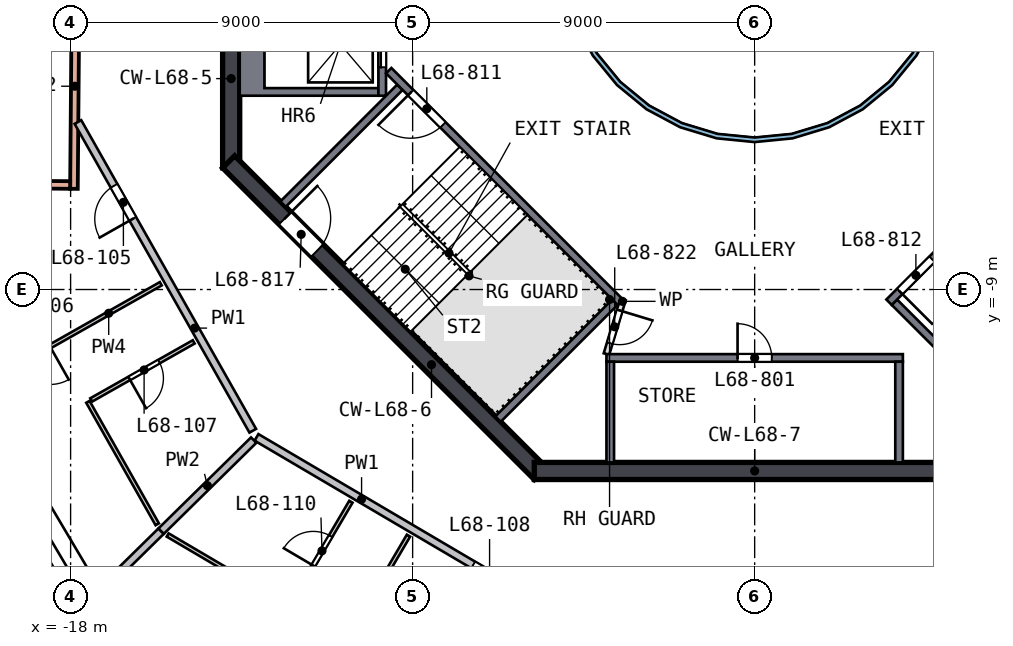
"""IFC4 building model, lengths in metres.
Left out: names, types, materials, properties, quantities, classifications, styles, units other than length and angle.
Written with IfcOpenShell. Run it as: python <this file> out.ifc"""

import sys

from ifc_helpers import new_model, si_unit, direction, frame, frame_2d, origin, place, context, subcontext, project, spatial, polyline, rectangle, outline, extrude, element, fill, save


model = new_model("IFC4")
c1 = context("Model", 3, precision=1e-05, world=origin(), true_north=direction((0.0, 1.0)))
c2 = subcontext(c1, "Body", "Model", "MODEL_VIEW")
j1 = project(units=[si_unit("LENGTHUNIT", "METRE"), si_unit("PLANEANGLEUNIT", "RADIAN")], contexts=[c1])
p1 = place(None, origin())
s1 = spatial("IfcSite", under=j1, at=p1, CompositionType="ELEMENT")
p2 = place(p1, origin())
s2 = spatial("IfcBuilding", under=s1, at=p2, CompositionType="ELEMENT")
p3 = place(p2, frame((0.0, 0.0, 277.5)))
s3 = spatial("IfcBuildingStorey", under=s2, at=p3, CompositionType="ELEMENT", Elevation=277.5)
p4 = place(p3, frame((-13.775, 5.799, 0.0), z_axis=(0.0, 0.0, 1.0), x_axis=(0.0, -1.0, 0.0)))
e1 = element("IfcWall", 1, at=p4, inside=s3, PredefinedType="SHEAR", context=c2, shape_type="SweptSolid", body=[
    extrude(rectangle(XDim=11.598, YDim=0.45, at=frame_2d((5.799, 0.0))), origin(), (0.0, 0.0, 1.0), 3.5),
])
p5 = place(p4, frame((4.899, 0.0, 0.0)))
e2 = element("IfcOpeningElement", 2, at=p5, cuts=e1, PredefinedType="OPENING", context=c2, shape_type="SweptSolid", body=[
    extrude(rectangle(XDim=1.8, YDim=2.1, at=frame_2d((0.9, 1.05))), frame((0.0, 0.235, 0.0), z_axis=(0.0, -1.0, 0.0), x_axis=(1.0, 0.0, 0.0)), (0.0, 0.0, 1.0), 0.47),
])
p6 = place(p3, frame((-13.841, -5.64, 0.0), z_axis=(0.0, 0.0, 1.0), x_axis=(0.707106781, -0.707106781, 0.0)))
e3 = element("IfcWall", 3, at=p6, inside=s3, PredefinedType="SHEAR", context=c2, shape_type="SweptSolid", body=[
    extrude(rectangle(XDim=11.598, YDim=0.45, at=frame_2d((5.799, 0.0))), origin(), (0.0, 0.0, 1.0), 3.5),
])
p7 = place(p6, frame((2.099, 0.0, 0.0)))
e4 = element("IfcOpeningElement", 4, at=p7, cuts=e3, PredefinedType="OPENING", context=c2, shape_type="SweptSolid", body=[
    extrude(rectangle(XDim=1.2, YDim=2.1, at=frame_2d((0.6, 1.05))), frame((0.0, 0.235, 0.0), z_axis=(0.0, -1.0, 0.0), x_axis=(1.0, 0.0, 0.0)), (0.0, 0.0, 1.0), 0.47),
])
p8 = place(p3, frame((-5.799, -13.775, 0.0), z_axis=(0.0, 0.0, 1.0), x_axis=(1.0, 0.0, 0.0)))
e5 = element("IfcWall", 5, at=p8, inside=s3, PredefinedType="SHEAR", context=c2, shape_type="SweptSolid", body=[
    extrude(rectangle(XDim=11.598, YDim=0.45, at=frame_2d((5.799, 0.0))), origin(), (0.0, 0.0, 1.0), 3.5),
])
p9 = place(p3, frame((-19.579, -14.503, 0.0), z_axis=(0.0, 0.0, 1.0), x_axis=(0.492728526, -0.870183084, 0.0)))
e6 = element("IfcWall", 6, at=p9, inside=s3, PredefinedType="SOLIDWALL", context=c2, shape_type="SweptSolid", body=[
    extrude(rectangle(XDim=3.427, YDim=0.15, at=frame_2d((1.713, 0.0))), origin(), (0.0, 0.0, 1.0), 2.525),
])
p10 = place(p9, frame((0.4, 0.0, 0.0)))
e7 = element("IfcOpeningElement", 7, at=p10, cuts=e6, PredefinedType="OPENING", context=c2, shape_type="SweptSolid", body=[
    extrude(rectangle(XDim=2.4, YDim=2.4, at=frame_2d((1.2, 1.2))), frame((0.0, 0.085, 0.0), z_axis=(0.0, -1.0, 0.0), x_axis=(1.0, 0.0, 0.0)), (0.0, 0.0, 1.0), 0.17),
])
p11 = place(p3, frame((-17.912, -6.35, 0.0), z_axis=(0.0, 0.0, 1.0), x_axis=(0.008375922, 0.999964921, 0.0)))
e8 = element("IfcWall", 8, at=p11, inside=s3, PredefinedType="SOLIDWALL", context=c2, shape_type="SweptSolid", body=[
    extrude(rectangle(XDim=13.0, YDim=0.2, at=frame_2d((6.5, 0.0))), origin(), (0.0, 0.0, 1.0), 3.19),
])
p12 = place(p11, frame((5.6, 0.0, 0.0)))
e9 = element("IfcOpeningElement", 9, at=p12, cuts=e8, PredefinedType="OPENING", context=c2, shape_type="SweptSolid", body=[
    extrude(rectangle(XDim=1.8, YDim=2.4, at=frame_2d((0.9, 1.2))), frame((0.0, 0.11, 0.0), z_axis=(0.0, -1.0, 0.0), x_axis=(1.0, 0.0, 0.0)), (0.0, 0.0, 1.0), 0.22),
])
p13 = place(p3, frame((-23.179, -6.206, 0.0), z_axis=(0.0, 0.0, 1.0), x_axis=(0.999965043, -0.008361386, 0.0)))
e10 = element("IfcWall", 10, at=p13, inside=s3, PredefinedType="SOLIDWALL", context=c2, shape_type="SweptSolid", body=[
    extrude(rectangle(XDim=5.168, YDim=0.2, at=frame_2d((2.584, 0.0))), origin(), (0.0, 0.0, 1.0), 3.19),
])
p14 = place(p3, origin())
e11 = element("IfcWall", 11, at=p14, inside=s3, PredefinedType="SOLIDWALL", context=c2, shape_type="SweptSolid", body=[
    extrude(outline(polyline([(-13.55, -3.9), (-13.55, -1.2), (-9.9, -1.2), (-9.9, -1.4), (-12.9, -1.4), (-12.9, -3.7), (-9.9, -3.7), (-9.9, -3.9), (-13.55, -3.9)])), origin(), (0.0, 0.0, 1.0), 3.19),
])
p15 = place(p3, frame((-9.8, -1.2, 0.0), z_axis=(0.0, 0.0, 1.0), x_axis=(0.0, -1.0, 0.0)))
e12 = element("IfcWall", 12, at=p15, inside=s3, PredefinedType="SOLIDWALL", context=c2, shape_type="SweptSolid", body=[
    extrude(rectangle(XDim=2.7, YDim=0.2, at=frame_2d((1.35, 0.0))), origin(), (0.0, 0.0, 1.0), 3.19),
])
p16 = place(p15, frame((0.75, 0.0, 0.0)))
e13 = element("IfcOpeningElement", 13, at=p16, cuts=e12, PredefinedType="OPENING", context=c2, shape_type="SweptSolid", body=[
    extrude(rectangle(XDim=1.2, YDim=2.1, at=frame_2d((0.6, 1.05))), frame((0.0, 0.11, 0.0), z_axis=(0.0, -1.0, 0.0), x_axis=(1.0, 0.0, 0.0)), (0.0, 0.0, 1.0), 0.22),
])
p17 = place(p3, frame((-3.9, -10.8, 0.0), z_axis=(0.0, 0.0, 1.0), x_axis=(1.0, 0.0, 0.0)))
e14 = element("IfcWall", 14, at=p17, inside=s3, PredefinedType="SOLIDWALL", context=c2, shape_type="SweptSolid", body=[
    extrude(rectangle(XDim=7.8, YDim=0.2, at=frame_2d((3.9, 0.0))), origin(), (0.0, 0.0, 1.0), 3.19),
])
p18 = place(p17, frame((3.45, 0.0, 0.0)))
e15 = element("IfcOpeningElement", 15, at=p18, cuts=e14, PredefinedType="OPENING", context=c2, shape_type="SweptSolid", body=[
    extrude(rectangle(XDim=0.9, YDim=2.1, at=frame_2d((0.45, 1.05))), frame((0.0, 0.11, 0.0), z_axis=(0.0, -1.0, 0.0), x_axis=(1.0, 0.0, 0.0)), (0.0, 0.0, 1.0), 0.22),
])
for number, where, z_axis, x_axis in (
    (16, (-3.8, -10.9, 0.0), (0.0, 0.0, 1.0), (0.0, -1.0, 0.0)),
    (17, (3.8, -10.9, 0.0), (0.0, 0.0, 1.0), (0.0, -1.0, 0.0)),
):
    element("IfcWall", number, at=place(p3, frame(where, z_axis=z_axis, x_axis=x_axis)), inside=s3, PredefinedType="SOLIDWALL", context=c2, shape_type="SweptSolid", body=[
        extrude(rectangle(XDim=2.65, YDim=0.2, at=frame_2d((1.325, 0.0))), origin(), (0.0, 0.0, 1.0), 3.19),
    ])
p19 = place(p3, frame((-3.535, -9.334, 0.0), z_axis=(0.0, 0.0, 1.0), x_axis=(-0.707120946, 0.707092617, 0.0)))
e18 = element("IfcWall", 18, at=p19, inside=s3, PredefinedType="SOLIDWALL", context=c2, shape_type="SweptSolid", body=[
    extrude(rectangle(XDim=8.618, YDim=0.2, at=frame_2d((4.309, 0.0))), origin(), (0.0, 0.0, 1.0), 3.19),
])
p20 = place(p19, frame((6.6, 0.0, 0.0)))
e19 = element("IfcOpeningElement", 19, at=p20, cuts=e18, PredefinedType="OPENING", context=c2, shape_type="SweptSolid", body=[
    extrude(rectangle(XDim=1.2, YDim=2.1, at=frame_2d((0.6, 1.05))), frame((0.0, 0.11, 0.0), z_axis=(0.0, -1.0, 0.0), x_axis=(1.0, 0.0, 0.0)), (0.0, 0.0, 1.0), 0.22),
])
for number, where, z_axis, x_axis in (
    (20, (-9.334, -3.677, 0.0), (0.0, 0.0, 1.0), (-0.707, -0.707, 0.0)),
    (21, (-3.677, -9.334, 0.0), (0.0, 0.0, 1.0), (-0.707, -0.707, 0.0)),
):
    element("IfcWall", number, at=place(p3, frame(where, z_axis=z_axis, x_axis=x_axis)), inside=s3, PredefinedType="SOLIDWALL", context=c2, shape_type="SweptSolid", body=[
        extrude(rectangle(XDim=4.35, YDim=0.2, at=frame_2d((2.175, 0.0))), origin(), (0.0, 0.0, 1.0), 3.19),
    ])
p21 = place(p3, frame((9.629, -3.24, 0.0), z_axis=(0.0, 0.0, 1.0), x_axis=(-0.707120946, -0.707092617, 0.0)))
e22 = element("IfcWall", 22, at=p21, inside=s3, PredefinedType="SOLIDWALL", context=c2, shape_type="SweptSolid", body=[
    extrude(rectangle(XDim=8.618, YDim=0.2, at=frame_2d((4.309, 0.0))), origin(), (0.0, 0.0, 1.0), 3.19),
])
p22 = place(p21, frame((7.018, 0.0, 0.0)))
e23 = element("IfcOpeningElement", 23, at=p22, cuts=e22, PredefinedType="OPENING", context=c2, shape_type="SweptSolid", body=[
    extrude(rectangle(XDim=1.2, YDim=2.1, at=frame_2d((0.6, 1.05))), frame((0.0, 0.11, 0.0), z_axis=(0.0, -1.0, 0.0), x_axis=(1.0, 0.0, 0.0)), (0.0, 0.0, 1.0), 0.22),
])
p23 = place(p3, frame((3.677, -9.334, 0.0), z_axis=(0.0, 0.0, 1.0), x_axis=(0.707106781, -0.707106781, 0.0)))
e24 = element("IfcWall", 24, at=p23, inside=s3, PredefinedType="SOLIDWALL", context=c2, shape_type="SweptSolid", body=[
    extrude(rectangle(XDim=4.35, YDim=0.2, at=frame_2d((2.175, 0.0))), origin(), (0.0, 0.0, 1.0), 3.19),
])
p24 = place(p3, frame((-3.465, -9.263, 0.0), z_axis=(0.0, 0.0, 1.0), x_axis=(-0.289808785, -0.957084567, 0.0)))
e25 = element("IfcWall", 25, at=p24, inside=s3, PredefinedType="PARTITIONING", context=c2, shape_type="SweptSolid", body=[
    extrude(rectangle(XDim=1.501, YDim=0.15, at=frame_2d((0.75, 0.0))), origin(), (0.0, 0.0, 1.0), 3.19),
])
p25 = place(p24, frame((0.301, 0.0, 0.0)))
e26 = element("IfcOpeningElement", 26, at=p25, cuts=e25, PredefinedType="OPENING", context=c2, shape_type="SweptSolid", body=[
    extrude(rectangle(XDim=0.9, YDim=2.1, at=frame_2d((0.45, 1.05))), frame((0.0, 0.085, 0.0), z_axis=(0.0, -1.0, 0.0), x_axis=(1.0, 0.0, 0.0)), (0.0, 0.0, 1.0), 0.17),
])
p26 = place(p3, origin())
e27 = element("IfcWall", 27, at=p26, inside=s3, PredefinedType="SOLIDWALL", context=c2, shape_type="SweptSolid", body=[
    extrude(outline(polyline([(5.021, -0.999), (4.73, -1.959), (4.257, -2.844), (3.62, -3.62), (2.844, -4.257), (1.959, -4.73), (0.999, -5.021), (0.0, -5.12), (-0.999, -5.021), (-1.959, -4.73), (-2.844, -4.257), (-3.62, -3.62), (-4.257, -2.844), (-4.73, -1.959), (-5.021, -0.999), (-5.12, 0.0), (-5.021, 0.999), (-4.73, 1.959), (-4.257, 2.844), (-3.62, 3.62), (-2.844, 4.257), (-1.959, 4.73), (-0.999, 5.021), (0.0, 5.12), (0.999, 5.021), (1.959, 4.73), (2.844, 4.257), (3.62, 3.62), (4.257, 2.844), (4.73, 1.959), (5.021, 0.999), (5.12, 0.0), (5.021, -0.999)]), holes=[polyline([(4.904, 0.976), (4.619, 1.913), (4.157, 2.778), (3.535, 3.535), (2.778, 4.157), (1.913, 4.619), (0.976, 4.904), (0.0, 5.0), (-0.976, 4.904), (-1.913, 4.619), (-2.778, 4.157), (-3.535, 3.535), (-4.157, 2.778), (-4.619, 1.913), (-4.904, 0.976), (-5.0, 0.0), (-4.904, -0.976), (-4.619, -1.913), (-4.157, -2.778), (-3.535, -3.535), (-2.778, -4.157), (-1.913, -4.619), (-0.976, -4.904), (0.0, -5.0), (0.976, -4.904), (1.913, -4.619), (2.778, -4.157), (3.535, -3.535), (4.157, -2.778), (4.619, -1.913), (4.904, -0.976), (5.0, 0.0), (4.904, 0.976)])]), origin(), (0.0, 0.0, 1.0), 3.19),
])
p27 = place(p3, frame((-13.207, -12.717, 0.0), z_axis=(0.0, 0.0, 1.0), x_axis=(-0.492724884, 0.870185146, 0.0)))
e28 = element("IfcWall", 28, at=p27, inside=s3, PredefinedType="SOLIDWALL", context=c2, shape_type="SweptSolid", body=[
    extrude(rectangle(XDim=9.336, YDim=0.2, at=frame_2d((4.668, 0.0))), origin(), (0.0, 0.0, 1.0), 3.19),
])
p28 = place(p27, frame((6.408, 0.0, 0.0)))
e29 = element("IfcOpeningElement", 29, at=p28, cuts=e28, PredefinedType="OPENING", context=c2, shape_type="SweptSolid", body=[
    extrude(rectangle(XDim=1.0, YDim=2.1, at=frame_2d((0.5, 1.05))), frame((0.0, 0.11, 0.0), z_axis=(0.0, -1.0, 0.0), x_axis=(1.0, 0.0, 0.0)), (0.0, 0.0, 1.0), 0.22),
])
p29 = place(p3, frame((-4.907, -17.718, 0.0), z_axis=(0.0, 0.0, 1.0), x_axis=(-0.861806246, 0.507237612, 0.0)))
e30 = element("IfcWall", 30, at=p29, inside=s3, PredefinedType="SOLIDWALL", context=c2, shape_type="SweptSolid", body=[
    extrude(rectangle(XDim=9.517, YDim=0.2, at=frame_2d((4.758, 0.0))), origin(), (0.0, 0.0, 1.0), 3.19),
])
p30 = place(p29, frame((1.9, 0.0, 0.0)))
e31 = element("IfcOpeningElement", 31, at=p30, cuts=e30, PredefinedType="OPENING", context=c2, shape_type="SweptSolid", body=[
    extrude(rectangle(XDim=1.0, YDim=2.1, at=frame_2d((0.5, 1.05))), frame((0.0, 0.11, 0.0), z_axis=(0.0, -1.0, 0.0), x_axis=(1.0, 0.0, 0.0)), (0.0, 0.0, 1.0), 0.22),
])
p31 = place(p3, frame((-15.618, -15.359, 0.0), z_axis=(0.0, 0.0, 1.0), x_axis=(-0.71298711, -0.701177139, 0.0)))
e32 = element("IfcWall", 32, at=p31, inside=s3, PredefinedType="SOLIDWALL", context=c2, shape_type="SweptSolid", body=[
    extrude(rectangle(XDim=3.06, YDim=0.2, at=frame_2d((1.53, 0.0))), origin(), (0.0, 0.0, 1.0), 2.69),
])
p32 = place(p3, frame((-13.182, -12.963, 0.0), z_axis=(0.0, 0.0, 1.0), x_axis=(-0.71297783, -0.701186576, 0.0)))
e33 = element("IfcWall", 33, at=p32, inside=s3, PredefinedType="SOLIDWALL", context=c2, shape_type="SweptSolid", body=[
    extrude(rectangle(XDim=3.416, YDim=0.2, at=frame_2d((1.708, 0.0))), origin(), (0.0, 0.0, 1.0), 3.19),
])
p33 = place(p3, frame((-15.627, -8.849, 0.0), z_axis=(0.0, 0.0, 1.0), x_axis=(-0.870190704, -0.492715069, 0.0)))
e34 = element("IfcWall", 34, at=p33, inside=s3, PredefinedType="PARTITIONING", context=c2, shape_type="SweptSolid", body=[
    extrude(rectangle(XDim=6.15, YDim=0.1, at=frame_2d((3.075, 0.0))), origin(), (0.0, 0.0, 1.0), 3.19),
])
p34 = place(p33, frame((3.35, 0.0, 0.0)))
e35 = element("IfcOpeningElement", 35, at=p34, cuts=e34, PredefinedType="OPENING", context=c2, shape_type="SweptSolid", body=[
    extrude(rectangle(XDim=1.0, YDim=2.1, at=frame_2d((0.5, 1.05))), frame((0.0, 0.06, 0.0), z_axis=(0.0, -1.0, 0.0), x_axis=(1.0, 0.0, 0.0)), (0.0, 0.0, 1.0), 0.12),
])
p35 = place(p3, frame((-17.545, -11.955, 0.0), z_axis=(0.0, 0.0, 1.0), x_axis=(0.492756443, -0.870167276, 0.0)))
e36 = element("IfcWall", 36, at=p35, inside=s3, PredefinedType="PARTITIONING", context=c2, shape_type="SweptSolid", body=[
    extrude(rectangle(XDim=3.704, YDim=0.1, at=frame_2d((1.852, 0.0))), origin(), (0.0, 0.0, 1.0), 3.19),
])
p36 = place(p3, frame((-14.761, -10.379, 0.0), z_axis=(0.0, 0.0, 1.0), x_axis=(-0.870194419, -0.492708506, 0.0)))
e37 = element("IfcWall", 37, at=p36, inside=s3, PredefinedType="PARTITIONING", context=c2, shape_type="SweptSolid", body=[
    extrude(rectangle(XDim=3.1, YDim=0.1, at=frame_2d((1.55, 0.0))), origin(), (0.0, 0.0, 1.0), 3.19),
])
p37 = place(p36, frame((1.05, 0.0, 0.0)))
e38 = element("IfcOpeningElement", 38, at=p37, cuts=e37, PredefinedType="OPENING", context=c2, shape_type="SweptSolid", body=[
    extrude(rectangle(XDim=0.9, YDim=2.1, at=frame_2d((0.45, 1.05))), frame((0.0, 0.06, 0.0), z_axis=(0.0, -1.0, 0.0), x_axis=(1.0, 0.0, 0.0)), (0.0, 0.0, 1.0), 0.12),
])
p38 = place(p3, frame((-15.446, -15.46, 0.0), z_axis=(0.0, 0.0, 1.0), x_axis=(0.861815808, -0.507221365, 0.0)))
e39 = element("IfcWall", 39, at=p38, inside=s3, PredefinedType="PARTITIONING", context=c2, shape_type="SweptSolid", body=[
    extrude(rectangle(XDim=3.711, YDim=0.1, at=frame_2d((1.855, 0.0))), origin(), (0.0, 0.0, 1.0), 3.19),
])
p39 = place(p3, frame((-12.197, -17.256, 0.0), z_axis=(0.0, 0.0, 1.0), x_axis=(0.5072507, 0.861798542, 0.0)))
e40 = element("IfcWall", 40, at=p39, inside=s3, PredefinedType="PARTITIONING", context=c2, shape_type="SweptSolid", body=[
    extrude(rectangle(XDim=3.1, YDim=0.1, at=frame_2d((1.55, 0.0))), origin(), (0.0, 0.0, 1.0), 3.19),
])
p40 = place(p39, frame((1.15, 0.0, 0.0)))
e41 = element("IfcOpeningElement", 41, at=p40, cuts=e40, PredefinedType="OPENING", context=c2, shape_type="SweptSolid", body=[
    extrude(rectangle(XDim=0.9, YDim=2.1, at=frame_2d((0.45, 1.05))), frame((0.0, 0.06, 0.0), z_axis=(0.0, -1.0, 0.0), x_axis=(1.0, 0.0, 0.0)), (0.0, 0.0, 1.0), 0.12),
])
p41 = place(p3, frame((-12.229, -20.777, 0.0), z_axis=(0.0, 0.0, 1.0), x_axis=(0.507256048, 0.861795394, 0.0)))
e42 = element("IfcWall", 42, at=p41, inside=s3, PredefinedType="PARTITIONING", context=c2, shape_type="SweptSolid", body=[
    extrude(rectangle(XDim=6.15, YDim=0.1, at=frame_2d((3.075, 0.0))), origin(), (0.0, 0.0, 1.0), 3.19),
])
p42 = place(p41, frame((1.8, 0.0, 0.0)))
e43 = element("IfcOpeningElement", 43, at=p42, cuts=e42, PredefinedType="OPENING", context=c2, shape_type="SweptSolid", body=[
    extrude(rectangle(XDim=1.0, YDim=2.1, at=frame_2d((0.5, 1.05))), frame((0.0, 0.06, 0.0), z_axis=(0.0, -1.0, 0.0), x_axis=(1.0, 0.0, 0.0)), (0.0, 0.0, 1.0), 0.12),
])
p43 = place(p10, origin())
e44 = element("IfcDoor", 44, at=p43, inside=s3, OperationType="SLIDING_TO_RIGHT", PredefinedType="DOOR", context=c2, shape_type="SweptSolid", body=[
    extrude(rectangle(XDim=2.4, YDim=2.4, at=frame_2d((1.2, 1.2))), frame((0.0, 0.025, 0.0), z_axis=(0.0, -1.0, 0.0), x_axis=(1.0, 0.0, 0.0)), (0.0, 0.0, 1.0), 0.05),
])
fill(e7, e44)
p44 = place(p18, origin())
e45 = element("IfcDoor", 45, at=p44, inside=s3, OperationType="SINGLE_SWING_LEFT", PredefinedType="DOOR", context=c2, shape_type="SweptSolid", body=[
    extrude(rectangle(XDim=0.9, YDim=2.1, at=frame_2d((0.45, 1.05))), frame((0.0, 0.025, 0.0), z_axis=(0.0, -1.0, 0.0), x_axis=(1.0, 0.0, 0.0)), (0.0, 0.0, 1.0), 0.05),
])
fill(e15, e45)
p45 = place(p16, origin())
e46 = element("IfcDoor", 46, at=p45, inside=s3, OperationType="DOUBLE_DOOR_SLIDING", PredefinedType="DOOR", context=c2, shape_type="SweptSolid", body=[
    extrude(rectangle(XDim=1.2, YDim=2.1, at=frame_2d((0.6, 1.05))), frame((0.0, 0.025, 0.0), z_axis=(0.0, -1.0, 0.0), x_axis=(1.0, 0.0, 0.0)), (0.0, 0.0, 1.0), 0.05),
])
fill(e13, e46)
p46 = place(p20, origin())
e47 = element("IfcDoor", 47, at=p46, inside=s3, OperationType="SINGLE_SWING_RIGHT", PredefinedType="DOOR", context=c2, shape_type="SweptSolid", body=[
    extrude(rectangle(XDim=1.2, YDim=2.1, at=frame_2d((0.6, 1.05))), frame((0.0, 0.025, 0.0), z_axis=(0.0, -1.0, 0.0), x_axis=(1.0, 0.0, 0.0)), (0.0, 0.0, 1.0), 0.05),
])
fill(e19, e47)
p47 = place(p22, origin())
e48 = element("IfcDoor", 48, at=p47, inside=s3, OperationType="SINGLE_SWING_RIGHT", PredefinedType="DOOR", context=c2, shape_type="SweptSolid", body=[
    extrude(rectangle(XDim=1.2, YDim=2.1, at=frame_2d((0.6, 1.05))), frame((0.0, 0.025, 0.0), z_axis=(0.0, -1.0, 0.0), x_axis=(1.0, 0.0, 0.0)), (0.0, 0.0, 1.0), 0.05),
])
fill(e23, e48)
p48 = place(p7, origin())
e49 = element("IfcDoor", 49, at=p48, inside=s3, OperationType="SINGLE_SWING_LEFT", PredefinedType="DOOR", context=c2, shape_type="SweptSolid", body=[
    extrude(rectangle(XDim=1.2, YDim=2.1, at=frame_2d((0.6, 1.05))), frame((0.0, 0.025, 0.0), z_axis=(0.0, -1.0, 0.0), x_axis=(1.0, 0.0, 0.0)), (0.0, 0.0, 1.0), 0.05),
])
fill(e4, e49)
p49 = place(p25, origin())
e50 = element("IfcDoor", 50, at=p49, inside=s3, OperationType="SINGLE_SWING_LEFT", PredefinedType="DOOR", context=c2, shape_type="SweptSolid", body=[
    extrude(rectangle(XDim=0.9, YDim=2.1, at=frame_2d((0.45, 1.05))), frame((0.0, 0.025, 0.0), z_axis=(0.0, -1.0, 0.0), x_axis=(1.0, 0.0, 0.0)), (0.0, 0.0, 1.0), 0.05),
])
fill(e26, e50)
p50 = place(p28, origin())
e51 = element("IfcDoor", 51, at=p50, inside=s3, OperationType="SINGLE_SWING_LEFT", PredefinedType="DOOR", context=c2, shape_type="SweptSolid", body=[
    extrude(rectangle(XDim=1.0, YDim=2.1, at=frame_2d((0.5, 1.05))), frame((0.0, 0.025, 0.0), z_axis=(0.0, -1.0, 0.0), x_axis=(1.0, 0.0, 0.0)), (0.0, 0.0, 1.0), 0.05),
])
fill(e29, e51)
p51 = place(p37, origin())
e52 = element("IfcDoor", 52, at=p51, inside=s3, OperationType="SINGLE_SWING_RIGHT", PredefinedType="DOOR", context=c2, shape_type="SweptSolid", body=[
    extrude(rectangle(XDim=0.9, YDim=2.1, at=frame_2d((0.45, 1.05))), frame((0.0, 0.025, 0.0), z_axis=(0.0, -1.0, 0.0), x_axis=(1.0, 0.0, 0.0)), (0.0, 0.0, 1.0), 0.05),
])
fill(e38, e52)
p52 = place(p30, origin())
e53 = element("IfcDoor", 53, at=p52, inside=s3, OperationType="SINGLE_SWING_LEFT", PredefinedType="DOOR", context=c2, shape_type="SweptSolid", body=[
    extrude(rectangle(XDim=1.0, YDim=2.1, at=frame_2d((0.5, 1.05))), frame((0.0, 0.025, 0.0), z_axis=(0.0, -1.0, 0.0), x_axis=(1.0, 0.0, 0.0)), (0.0, 0.0, 1.0), 0.05),
])
fill(e31, e53)
p53 = place(p40, origin())
e54 = element("IfcDoor", 54, at=p53, inside=s3, OperationType="SINGLE_SWING_LEFT", PredefinedType="DOOR", context=c2, shape_type="SweptSolid", body=[
    extrude(rectangle(XDim=0.9, YDim=2.1, at=frame_2d((0.45, 1.05))), frame((0.0, 0.025, 0.0), z_axis=(0.0, -1.0, 0.0), x_axis=(1.0, 0.0, 0.0)), (0.0, 0.0, 1.0), 0.05),
])
fill(e41, e54)
save(model, sys.argv[1])
